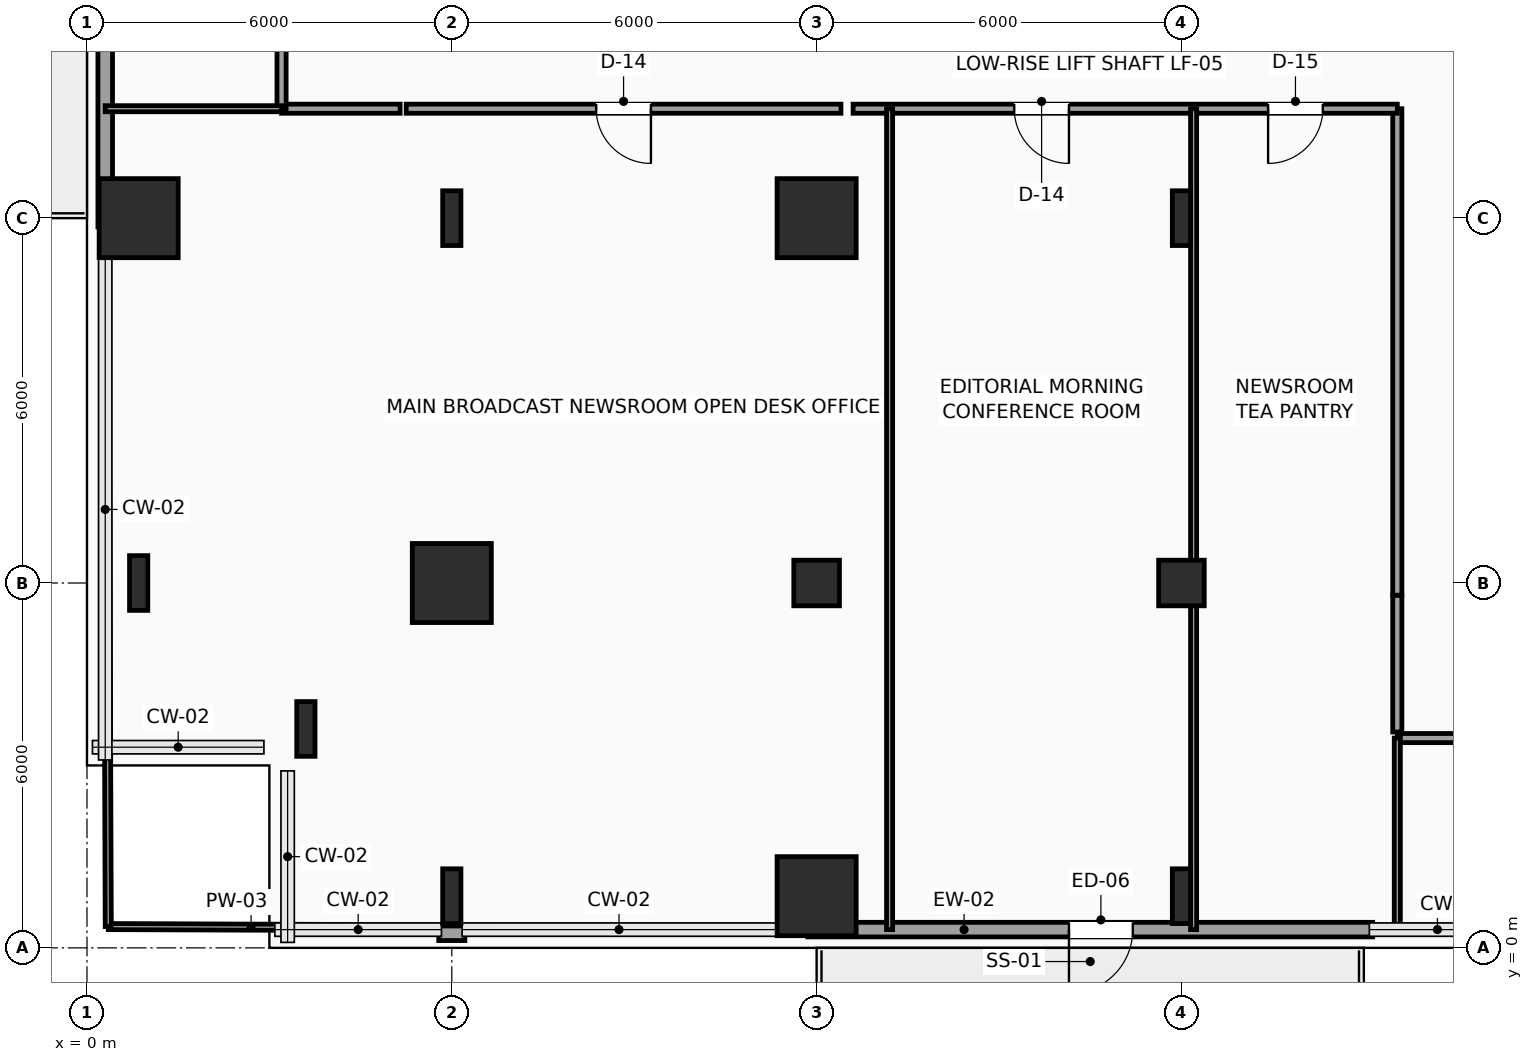
"""IFC4 building model, lengths in metres.
Left out: names, types, materials, properties, quantities, classifications, styles, units other than length and angle.
Written with IfcOpenShell. Run it as: python <this file> out.ifc"""

import sys

from ifc_helpers import new_model, si_unit, direction, frame, frame_2d, origin, origin_2d, place, context, subcontext, project, spatial, rectangle, hollow_rectangle, i_section, extrude, element, fill, save


model = new_model("IFC4")
c1 = context("Model", 3, precision=1e-05, world=origin(), true_north=direction((0.0, 1.0)))
c2 = subcontext(c1, "Body", "Model", "MODEL_VIEW")
j1 = project(units=[si_unit("LENGTHUNIT", "METRE"), si_unit("PLANEANGLEUNIT", "RADIAN")], contexts=[c1])
p1 = place(None, origin())
s1 = spatial("IfcSite", under=j1, at=p1, CompositionType="ELEMENT")
p2 = place(p1, origin())
s2 = spatial("IfcBuilding", under=s1, at=p2, CompositionType="ELEMENT")
p3 = place(p2, frame((0.0, 0.0, 32.4)))
s3 = spatial("IfcBuildingStorey", under=s2, at=p3, CompositionType="ELEMENT", Elevation=32.4)
for number, where, z_axis, x_axis in (
    (1, (3.6, 3.6, 0.0), (0.0, 0.0, 1.0), (1.0, 0.0, 0.0)),
    (2, (0.85, 6.0, 0.0), (0.0, 0.0, 1.0), (1.0, 0.0, 0.0)),
):
    element("IfcColumn", number, at=place(p3, frame(where, z_axis=z_axis, x_axis=x_axis)), inside=s3, PredefinedType="COLUMN", context=c2, shape_type="SweptSolid", body=[
        extrude(i_section(OverallWidth=0.3, OverallDepth=0.9, WebThickness=0.019, FlangeThickness=0.035, FilletRadius=0.03, at=origin_2d()), origin(), (0.0, 0.0, 1.0), 3.9),
    ])
p4 = place(p3, frame((0.85, 12.0, 0.0), z_axis=(0.0, 0.0, 1.0), x_axis=(1.0, 0.0, 0.0)))
e3 = element("IfcColumn", 3, at=p4, inside=s3, PredefinedType="COLUMN", context=c2, shape_type="SweptSolid", body=[
    extrude(rectangle(XDim=1.3, YDim=1.3, at=origin_2d()), origin(), (0.0, 0.0, 1.0), 3.9),
])
p5 = place(p3, frame((6.0, 0.85, 0.0), z_axis=(0.0, 0.0, 1.0), x_axis=(1.0, 0.0, 0.0)))
e4 = element("IfcColumn", 4, at=p5, inside=s3, PredefinedType="COLUMN", context=c2, shape_type="SweptSolid", body=[
    extrude(i_section(OverallWidth=0.3, OverallDepth=0.9, WebThickness=0.019, FlangeThickness=0.035, FilletRadius=0.03, at=origin_2d()), origin(), (0.0, 0.0, 1.0), 3.9),
])
p6 = place(p3, frame((6.0, 6.0, 0.0), z_axis=(0.0, 0.0, 1.0), x_axis=(1.0, 0.0, 0.0)))
e5 = element("IfcColumn", 5, at=p6, inside=s3, PredefinedType="COLUMN", context=c2, shape_type="SweptSolid", body=[
    extrude(rectangle(XDim=1.3, YDim=1.3, at=origin_2d()), origin(), (0.0, 0.0, 1.0), 3.9),
])
p7 = place(p3, frame((6.0, 12.0, 0.0), z_axis=(0.0, 0.0, 1.0), x_axis=(1.0, 0.0, 0.0)))
e6 = element("IfcColumn", 6, at=p7, inside=s3, PredefinedType="COLUMN", context=c2, shape_type="SweptSolid", body=[
    extrude(i_section(OverallWidth=0.3, OverallDepth=0.9, WebThickness=0.019, FlangeThickness=0.035, FilletRadius=0.03, at=origin_2d()), origin(), (0.0, 0.0, 1.0), 3.9),
])
p8 = place(p3, frame((12.0, 0.85, 0.0), z_axis=(0.0, 0.0, 1.0), x_axis=(1.0, 0.0, 0.0)))
e7 = element("IfcColumn", 7, at=p8, inside=s3, PredefinedType="COLUMN", context=c2, shape_type="SweptSolid", body=[
    extrude(rectangle(XDim=1.3, YDim=1.3, at=origin_2d()), origin(), (0.0, 0.0, 1.0), 3.9),
])
p9 = place(p3, frame((12.0, 6.0, 0.0), z_axis=(0.0, 0.0, 1.0), x_axis=(1.0, 0.0, 0.0)))
e8 = element("IfcColumn", 8, at=p9, inside=s3, PredefinedType="COLUMN", context=c2, shape_type="SweptSolid", body=[
    extrude(hollow_rectangle(XDim=0.75, YDim=0.75, WallThickness=0.035, InnerFilletRadius=0.035, OuterFilletRadius=0.05, at=origin_2d()), origin(), (0.0, 0.0, 1.0), 3.9),
])
p10 = place(p3, frame((12.0, 12.0, 0.0), z_axis=(0.0, 0.0, 1.0), x_axis=(1.0, 0.0, 0.0)))
e9 = element("IfcColumn", 9, at=p10, inside=s3, PredefinedType="COLUMN", context=c2, shape_type="SweptSolid", body=[
    extrude(rectangle(XDim=1.3, YDim=1.3, at=origin_2d()), origin(), (0.0, 0.0, 1.0), 3.9),
])
p11 = place(p3, frame((18.0, 0.85, 0.0), z_axis=(0.0, 0.0, 1.0), x_axis=(1.0, 0.0, 0.0)))
e10 = element("IfcColumn", 10, at=p11, inside=s3, PredefinedType="COLUMN", context=c2, shape_type="SweptSolid", body=[
    extrude(i_section(OverallWidth=0.3, OverallDepth=0.9, WebThickness=0.019, FlangeThickness=0.035, FilletRadius=0.03, at=origin_2d()), origin(), (0.0, 0.0, 1.0), 3.9),
])
p12 = place(p3, frame((18.0, 6.0, 0.0), z_axis=(0.0, 0.0, 1.0), x_axis=(1.0, 0.0, 0.0)))
e11 = element("IfcColumn", 11, at=p12, inside=s3, PredefinedType="COLUMN", context=c2, shape_type="SweptSolid", body=[
    extrude(hollow_rectangle(XDim=0.75, YDim=0.75, WallThickness=0.035, InnerFilletRadius=0.035, OuterFilletRadius=0.05, at=origin_2d()), origin(), (0.0, 0.0, 1.0), 3.9),
])
p13 = place(p3, frame((18.0, 12.0, 0.0), z_axis=(0.0, 0.0, 1.0), x_axis=(1.0, 0.0, 0.0)))
e12 = element("IfcColumn", 12, at=p13, inside=s3, PredefinedType="COLUMN", context=c2, shape_type="SweptSolid", body=[
    extrude(i_section(OverallWidth=0.3, OverallDepth=0.9, WebThickness=0.019, FlangeThickness=0.035, FilletRadius=0.03, at=origin_2d()), origin(), (0.0, 0.0, 1.0), 3.9),
])
p14 = place(p3, frame((21.145, 0.3, 0.0), z_axis=(0.0, 0.0, 1.0), x_axis=(-1.0, 0.0, 0.0)))
e13 = element("IfcWall", 13, at=p14, inside=s3, PredefinedType="SOLIDWALL", context=c2, shape_type="SweptSolid", body=[
    extrude(rectangle(XDim=9.29, YDim=0.24, at=frame_2d((4.645, 0.0))), origin(), (0.0, 0.0, 1.0), 3.65),
])
p15 = place(p14, frame((3.945, 0.0, 0.0)))
e14 = element("IfcOpeningElement", 14, at=p15, cuts=e13, PredefinedType="OPENING", context=c2, shape_type="SweptSolid", body=[
    extrude(rectangle(XDim=1.05, YDim=2.2, at=frame_2d((0.525, 1.1))), frame((0.0, 0.13, 0.0), z_axis=(0.0, -1.0, 0.0), x_axis=(1.0, 0.0, 0.0)), (0.0, 0.0, 1.0), 0.26),
])
p16 = place(p3, frame((0.3, 11.855, 0.0), z_axis=(0.0, 0.0, 1.0), x_axis=(0.0, 1.0, 0.0)))
e15 = element("IfcWall", 15, at=p16, inside=s3, PredefinedType="SOLIDWALL", context=c2, shape_type="SweptSolid", body=[
    extrude(rectangle(XDim=9.29, YDim=0.24, at=frame_2d((4.645, 0.0))), origin(), (0.0, 0.0, 1.0), 3.65),
])
p17 = place(p16, frame((3.945, 0.0, 0.0)))
e16 = element("IfcOpeningElement", 16, at=p17, cuts=e15, PredefinedType="OPENING", context=c2, shape_type="SweptSolid", body=[
    extrude(rectangle(XDim=1.05, YDim=2.2, at=frame_2d((0.525, 1.1))), frame((0.0, 0.13, 0.0), z_axis=(0.0, -1.0, 0.0), x_axis=(1.0, 0.0, 0.0)), (0.0, 0.0, 1.0), 0.26),
])
p18 = place(p3, frame((6.215, 0.24, 0.0), z_axis=(0.0, 0.0, 1.0), x_axis=(-1.0, 0.0, 0.0)))
e17 = element("IfcWall", 17, at=p18, inside=s3, PredefinedType="SOLIDWALL", context=c2, shape_type="SweptSolid", body=[
    extrude(rectangle(XDim=0.43, YDim=0.24, at=frame_2d((0.215, 0.0))), origin(), (0.0, 0.0, 1.0), 3.65),
])
p19 = place(p3, frame((36.15, 3.45, 0.0), z_axis=(0.0, 0.0, 1.0), x_axis=(-1.0, 0.0, 0.0)))
e18 = element("IfcWall", 18, at=p19, inside=s3, PredefinedType="PARTITIONING", context=c2, shape_type="SweptSolid", body=[
    extrude(rectangle(XDim=14.6, YDim=0.15, at=frame_2d((7.3, 0.0))), origin(), (0.0, 0.0, 1.0), 3.142),
])
p20 = place(p19, frame((11.325, 0.0, 0.0)))
e19 = element("IfcOpeningElement", 19, at=p20, cuts=e18, PredefinedType="OPENING", context=c2, shape_type="SweptSolid", body=[
    extrude(rectangle(XDim=0.9, YDim=2.1, at=frame_2d((0.45, 1.05))), frame((0.0, 0.085, 0.0), z_axis=(0.0, -1.0, 0.0), x_axis=(1.0, 0.0, 0.0)), (0.0, 0.0, 1.0), 0.17),
])
p21 = place(p19, frame((5.7, 0.0, 0.0)))
e20 = element("IfcOpeningElement", 20, at=p21, cuts=e18, PredefinedType="OPENING", context=c2, shape_type="SweptSolid", body=[
    extrude(rectangle(XDim=0.9, YDim=2.1, at=frame_2d((0.45, 1.05))), frame((0.0, 0.085, 0.0), z_axis=(0.0, -1.0, 0.0), x_axis=(1.0, 0.0, 0.0)), (0.0, 0.0, 1.0), 0.17),
])
p22 = place(p3, frame((21.55, 3.55, 0.0), z_axis=(0.0, 0.0, 1.0), x_axis=(0.0, 1.0, 0.0)))
e21 = element("IfcWall", 21, at=p22, inside=s3, PredefinedType="PARTITIONING", context=c2, shape_type="SweptSolid", body=[
    extrude(rectangle(XDim=2.25, YDim=0.15, at=frame_2d((1.125, 0.0))), origin(), (0.0, 0.0, 1.0), 3.65),
])
p23 = place(p3, frame((21.55, 5.8, 0.0), z_axis=(0.0, 0.0, 1.0), x_axis=(0.0, 1.0, 0.0)))
e22 = element("IfcWall", 22, at=p23, inside=s3, PredefinedType="PARTITIONING", context=c2, shape_type="SweptSolid", body=[
    extrude(rectangle(XDim=8.0, YDim=0.15, at=frame_2d((4.0, 0.0))), origin(), (0.0, 0.0, 1.0), 3.65),
])
p24 = place(p3, frame((21.55, 13.8, 0.0), z_axis=(0.0, 0.0, 1.0), x_axis=(-1.0, 0.0, 0.0)))
e23 = element("IfcWall", 23, at=p24, inside=s3, PredefinedType="PARTITIONING", context=c2, shape_type="SweptSolid", body=[
    extrude(rectangle(XDim=8.95, YDim=0.15, at=frame_2d((4.475, 0.0))), origin(), (0.0, 0.0, 1.0), 3.65),
])
p25 = place(p24, frame((5.4, 0.0, 0.0)))
e24 = element("IfcOpeningElement", 24, at=p25, cuts=e23, PredefinedType="OPENING", context=c2, shape_type="SweptSolid", body=[
    extrude(rectangle(XDim=0.9, YDim=2.1, at=frame_2d((0.45, 1.05))), frame((0.0, 0.085, 0.0), z_axis=(0.0, -1.0, 0.0), x_axis=(1.0, 0.0, 0.0)), (0.0, 0.0, 1.0), 0.17),
])
p26 = place(p24, frame((1.225, 0.0, 0.0)))
e25 = element("IfcOpeningElement", 25, at=p26, cuts=e23, PredefinedType="OPENING", context=c2, shape_type="SweptSolid", body=[
    extrude(rectangle(XDim=0.9, YDim=2.1, at=frame_2d((0.45, 1.05))), frame((0.0, 0.085, 0.0), z_axis=(0.0, -1.0, 0.0), x_axis=(1.0, 0.0, 0.0)), (0.0, 0.0, 1.0), 0.17),
])
p27 = place(p3, frame((12.4, 13.8, 0.0), z_axis=(0.0, 0.0, 1.0), x_axis=(-1.0, 0.0, 0.0)))
e26 = element("IfcWall", 26, at=p27, inside=s3, PredefinedType="PARTITIONING", context=c2, shape_type="SweptSolid", body=[
    extrude(rectangle(XDim=7.15, YDim=0.15, at=frame_2d((3.575, 0.0))), origin(), (0.0, 0.0, 1.0), 3.65),
])
p28 = place(p27, frame((3.125, 0.0, 0.0)))
e27 = element("IfcOpeningElement", 27, at=p28, cuts=e26, PredefinedType="OPENING", context=c2, shape_type="SweptSolid", body=[
    extrude(rectangle(XDim=0.9, YDim=2.1, at=frame_2d((0.45, 1.05))), frame((0.0, 0.085, 0.0), z_axis=(0.0, -1.0, 0.0), x_axis=(1.0, 0.0, 0.0)), (0.0, 0.0, 1.0), 0.17),
])
p29 = place(p3, frame((5.15, 13.8, 0.0), z_axis=(0.0, 0.0, 1.0), x_axis=(-1.0, 0.0, 0.0)))
e28 = element("IfcWall", 28, at=p29, inside=s3, PredefinedType="PARTITIONING", context=c2, shape_type="SweptSolid", body=[
    extrude(rectangle(XDim=1.95, YDim=0.15, at=frame_2d((0.975, 0.0))), origin(), (0.0, 0.0, 1.0), 3.65),
])
p30 = place(p3, frame((3.2, 13.8, 0.0), z_axis=(0.0, 0.0, 1.0), x_axis=(0.0, 1.0, 0.0)))
e29 = element("IfcWall", 29, at=p30, inside=s3, PredefinedType="PARTITIONING", context=c2, shape_type="SweptSolid", body=[
    extrude(rectangle(XDim=16.45, YDim=0.15, at=frame_2d((8.225, 0.0))), origin(), (0.0, 0.0, 1.0), 3.65),
])
p31 = place(p30, frame((2.65, 0.0, 0.0)))
e30 = element("IfcOpeningElement", 30, at=p31, cuts=e29, PredefinedType="OPENING", context=c2, shape_type="SweptSolid", body=[
    extrude(rectangle(XDim=0.9, YDim=2.1, at=frame_2d((0.45, 1.05))), frame((0.0, 0.085, 0.0), z_axis=(0.0, -1.0, 0.0), x_axis=(1.0, 0.0, 0.0)), (0.0, 0.0, 1.0), 0.17),
])
p32 = place(p30, frame((8.85, 0.0, 0.0)))
e31 = element("IfcOpeningElement", 31, at=p32, cuts=e29, PredefinedType="OPENING", context=c2, shape_type="SweptSolid", body=[
    extrude(rectangle(XDim=0.9, YDim=2.1, at=frame_2d((0.45, 1.05))), frame((0.0, 0.085, 0.0), z_axis=(0.0, -1.0, 0.0), x_axis=(1.0, 0.0, 0.0)), (0.0, 0.0, 1.0), 0.17),
])
p33 = place(p30, frame((13.975, 0.0, 0.0)))
e32 = element("IfcOpeningElement", 32, at=p33, cuts=e29, PredefinedType="OPENING", context=c2, shape_type="SweptSolid", body=[
    extrude(rectangle(XDim=0.9, YDim=2.1, at=frame_2d((0.45, 1.05))), frame((0.0, 0.085, 0.0), z_axis=(0.0, -1.0, 0.0), x_axis=(1.0, 0.0, 0.0)), (0.0, 0.0, 1.0), 0.17),
])
p34 = place(p3, frame((0.35, 0.35, 0.0), z_axis=(0.0, 0.0, 1.0), x_axis=(0.999992363151, -0.003908150379, 0.0)))
e33 = element("IfcWall", 33, at=p34, inside=s3, PredefinedType="PARTITIONING", context=c2, shape_type="SweptSolid", body=[
    extrude(rectangle(XDim=5.435, YDim=0.1, at=frame_2d((2.717, 0.0))), origin(), (0.0, 0.0, 1.0), 3.65),
])
p35 = place(p3, frame((6.215, 0.327, 0.0), z_axis=(0.0, 0.0, 1.0), x_axis=(0.999992410931, -0.003895905674, 0.0)))
e34 = element("IfcWall", 34, at=p35, inside=s3, PredefinedType="PARTITIONING", context=c2, shape_type="SweptSolid", body=[
    extrude(rectangle(XDim=5.64, YDim=0.1, at=frame_2d((2.82, 0.0))), origin(), (0.0, 0.0, 1.0), 3.65),
])
p36 = place(p3, frame((0.35, 0.35, 0.0), z_axis=(0.0, 0.0, 1.0), x_axis=(-0.003734801216, 0.999993025606, 0.0)))
e35 = element("IfcWall", 35, at=p36, inside=s3, PredefinedType="PARTITIONING", context=c2, shape_type="SweptSolid", body=[
    extrude(rectangle(XDim=11.505, YDim=0.1, at=frame_2d((5.752, 0.0))), origin(), (0.0, 0.0, 1.0), 3.65),
])
p37 = place(p3, frame((13.2, 0.3, 0.0), z_axis=(0.0, 0.0, 1.0), x_axis=(0.0, 1.0, 0.0)))
e36 = element("IfcWall", 36, at=p37, inside=s3, PredefinedType="PARTITIONING", context=c2, shape_type="SweptSolid", body=[
    extrude(rectangle(XDim=13.5, YDim=0.1, at=frame_2d((6.75, 0.0))), origin(), (0.0, 0.0, 1.0), 3.65),
])
p38 = place(p3, frame((18.2, 0.3, 0.0), z_axis=(0.0, 0.0, 1.0), x_axis=(0.0, 1.0, 0.0)))
e37 = element("IfcWall", 37, at=p38, inside=s3, PredefinedType="PARTITIONING", context=c2, shape_type="SweptSolid", body=[
    extrude(rectangle(XDim=13.5, YDim=0.1, at=frame_2d((6.75, 0.0))), origin(), (0.0, 0.0, 1.0), 2.992),
])
p39 = place(p3, frame((0.3, 13.8, 0.0), z_axis=(0.0, 0.0, 1.0), x_axis=(1.0, 0.0, 0.0)))
e38 = element("IfcWall", 38, at=p39, inside=s3, PredefinedType="PARTITIONING", context=c2, shape_type="SweptSolid", body=[
    extrude(rectangle(XDim=2.9, YDim=0.1, at=frame_2d((1.45, 0.0))), origin(), (0.0, 0.0, 1.0), 3.65),
])
p40 = place(p3, frame((21.55, 0.3, 0.0), z_axis=(0.0, 0.0, 1.0), x_axis=(0.0, 1.0, 0.0)))
e39 = element("IfcWall", 39, at=p40, inside=s3, PredefinedType="PARTITIONING", context=c2, shape_type="SweptSolid", body=[
    extrude(rectangle(XDim=3.15, YDim=0.1, at=frame_2d((1.575, 0.0))), origin(), (0.0, 0.0, 1.0), 3.65),
])
p41 = place(p15, origin())
e40 = element("IfcDoor", 40, at=p41, inside=s3, OperationType="SINGLE_SWING_RIGHT", PredefinedType="DOOR", context=c2, shape_type="SweptSolid", body=[
    extrude(rectangle(XDim=1.05, YDim=2.2, at=frame_2d((0.525, 1.1))), frame((0.0, 0.025, 0.0), z_axis=(0.0, -1.0, 0.0), x_axis=(1.0, 0.0, 0.0)), (0.0, 0.0, 1.0), 0.05),
])
fill(e14, e40)
p42 = place(p25, origin())
e41 = element("IfcDoor", 41, at=p42, inside=s3, OperationType="SINGLE_SWING_LEFT", PredefinedType="DOOR", context=c2, shape_type="SweptSolid", body=[
    extrude(rectangle(XDim=0.9, YDim=2.1, at=frame_2d((0.45, 1.05))), frame((0.0, 0.025, 0.0), z_axis=(0.0, -1.0, 0.0), x_axis=(1.0, 0.0, 0.0)), (0.0, 0.0, 1.0), 0.05),
])
fill(e24, e41)
p43 = place(p26, origin())
e42 = element("IfcDoor", 42, at=p43, inside=s3, OperationType="SINGLE_SWING_RIGHT", PredefinedType="DOOR", context=c2, shape_type="SweptSolid", body=[
    extrude(rectangle(XDim=0.9, YDim=2.1, at=frame_2d((0.45, 1.05))), frame((0.0, 0.025, 0.0), z_axis=(0.0, -1.0, 0.0), x_axis=(1.0, 0.0, 0.0)), (0.0, 0.0, 1.0), 0.05),
])
fill(e25, e42)
p44 = place(p28, origin())
e43 = element("IfcDoor", 43, at=p44, inside=s3, OperationType="SINGLE_SWING_LEFT", PredefinedType="DOOR", context=c2, shape_type="SweptSolid", body=[
    extrude(rectangle(XDim=0.9, YDim=2.1, at=frame_2d((0.45, 1.05))), frame((0.0, 0.025, 0.0), z_axis=(0.0, -1.0, 0.0), x_axis=(1.0, 0.0, 0.0)), (0.0, 0.0, 1.0), 0.05),
])
fill(e27, e43)
save(model, sys.argv[1])
